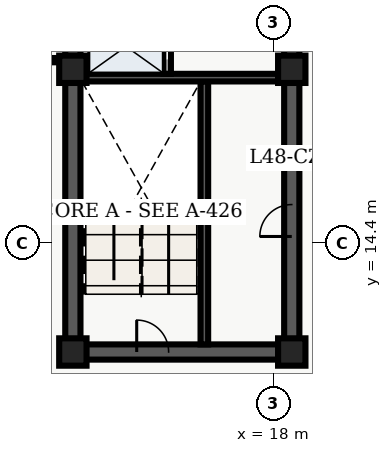
"""IFC4 building model, lengths in metres.
Left out: names, types, materials, properties, quantities, classifications, styles, units other than length and angle.
Written with IfcOpenShell. Run it as: python <this file> out.ifc"""

import sys

from ifc_helpers import new_model, entity, si_unit, converted_unit, direction, frame, origin_with_axes, origin_2d_with_axis, place, context, subcontext, project, spatial, polyline, rectangle, outline, extrude, element, fill, save


model = new_model("IFC4")
c1 = context("Model", 3, precision=1e-05, world=origin_with_axes(), true_north=direction((0.0, 1.0)))
c2 = subcontext(c1, "Body", "Model", "MODEL_VIEW")
j1 = project(units=[si_unit("LENGTHUNIT", "METRE"), converted_unit("PLANEANGLEUNIT", "DEGREE", entity("IfcPlaneAngleMeasure", 0.017), si_unit("PLANEANGLEUNIT", "RADIAN"), dimensions=[0, 0, 0, 0, 0, 0, 0])], contexts=[c1])
p1 = place(None, origin_with_axes())
s1 = spatial("IfcSite", under=j1, at=p1, CompositionType="ELEMENT")
p2 = place(p1, origin_with_axes())
s2 = spatial("IfcBuilding", under=s1, at=p2, CompositionType="ELEMENT")
p3 = place(p2, frame((0.0, 0.0, 196.5), z_axis=(0.0, 0.0, 1.0), x_axis=(1.0, 0.0, 0.0)))
s3 = spatial("IfcBuildingStorey", under=s2, at=p3, CompositionType="ELEMENT", Elevation=196.5)
p4 = place(p3, frame((11.4, 10.8, 0.0), z_axis=(0.0, 0.0, 1.0), x_axis=(0.0, 1.0, 0.0)))
e1 = element("IfcWall", 1, at=p4, inside=s3, PredefinedType="SHEAR", context=c2, shape_type="SweptSolid", body=[
    extrude(outline(polyline([(0.0, -0.25), (27.0, -0.25), (27.0, 0.25), (0.0, 0.25), (0.0, -0.25)])), origin_with_axes(), (0.0, 0.0, 1.0), 3.66),
])
p5 = place(p3, frame((11.4, 10.8, 0.0), z_axis=(0.0, 0.0, 1.0), x_axis=(1.0, 0.0, 0.0)))
e2 = element("IfcWall", 2, at=p5, inside=s3, PredefinedType="SHEAR", context=c2, shape_type="SweptSolid", body=[
    extrude(outline(polyline([(0.0, -0.25), (7.2, -0.25), (7.2, 0.25), (0.0, 0.25), (0.0, -0.25)])), origin_with_axes(), (0.0, 0.0, 1.0), 3.66),
])
p6 = place(p5, frame((2.625, 0.0, 0.0), z_axis=(0.0, 0.0, 1.0), x_axis=(1.0, 0.0, 0.0)))
e3 = element("IfcOpeningElement", 3, at=p6, cuts=e2, PredefinedType="OPENING", context=c2, shape_type="SweptSolid", body=[
    extrude(rectangle(XDim=1.05, YDim=0.52, at=origin_2d_with_axis()), origin_with_axes(), (0.0, 0.0, 1.0), 2.15),
])
p7 = place(p3, frame((18.6, 10.8, 0.0), z_axis=(0.0, 0.0, 1.0), x_axis=(0.0, 1.0, 0.0)))
e4 = element("IfcWall", 4, at=p7, inside=s3, PredefinedType="SHEAR", context=c2, shape_type="SweptSolid", body=[
    extrude(outline(polyline([(0.0, -0.25), (13.5, -0.25), (13.5, 0.25), (0.0, 0.25), (0.0, -0.25)])), origin_with_axes(), (0.0, 0.0, 1.0), 3.66),
])
p8 = place(p7, frame((11.125, 0.0, 0.0), z_axis=(0.0, 0.0, 1.0), x_axis=(1.0, 0.0, 0.0)))
e5 = element("IfcOpeningElement", 5, at=p8, cuts=e4, PredefinedType="OPENING", context=c2, shape_type="SweptSolid", body=[
    extrude(rectangle(XDim=1.05, YDim=0.52, at=origin_2d_with_axis()), origin_with_axes(), (0.0, 0.0, 1.0), 2.15),
])
p9 = place(p7, frame((4.325, 0.0, 0.0), z_axis=(0.0, 0.0, 1.0), x_axis=(1.0, 0.0, 0.0)))
e6 = element("IfcOpeningElement", 6, at=p9, cuts=e4, PredefinedType="OPENING", context=c2, shape_type="SweptSolid", body=[
    extrude(rectangle(XDim=1.05, YDim=0.52, at=origin_2d_with_axis()), origin_with_axes(), (0.0, 0.0, 1.0), 2.15),
])
p10 = place(p3, frame((15.725, 11.05, 0.0), z_axis=(0.0, 0.0, 1.0), x_axis=(0.0, 1.0, 0.0)))
e7 = element("IfcWall", 7, at=p10, inside=s3, PredefinedType="SHEAR", context=c2, shape_type="SweptSolid", body=[
    extrude(outline(polyline([(0.0, -0.125), (8.65, -0.125), (8.65, 0.125), (0.0, 0.125), (0.0, -0.125)])), origin_with_axes(), (0.0, 0.0, 1.0), 3.66),
])
p11 = place(p3, frame((11.65, 19.825, 0.0), z_axis=(0.0, 0.0, 1.0), x_axis=(1.0, 0.0, 0.0)))
e8 = element("IfcWall", 8, at=p11, inside=s3, PredefinedType="SHEAR", context=c2, shape_type="SweptSolid", body=[
    extrude(outline(polyline([(0.0, -0.125), (6.7, -0.125), (6.7, 0.125), (0.0, 0.125), (0.0, -0.125)])), origin_with_axes(), (0.0, 0.0, 1.0), 3.66),
])
p12 = place(p3, frame((14.5, 19.95, 0.0), z_axis=(0.0, 0.0, 1.0), x_axis=(0.0, 1.0, 0.0)))
e9 = element("IfcWall", 9, at=p12, inside=s3, PredefinedType="SOLIDWALL", context=c2, shape_type="SweptSolid", body=[
    extrude(outline(polyline([(0.0, -0.125), (6.25, -0.125), (6.25, 0.125), (0.0, 0.125), (0.0, -0.125)])), origin_with_axes(), (0.0, 0.0, 1.0), 2.7),
])
p13 = place(p12, frame((1.025, 0.0, 0.0), z_axis=(0.0, 0.0, 1.0), x_axis=(1.0, 0.0, 0.0)))
e10 = element("IfcOpeningElement", 10, at=p13, cuts=e9, PredefinedType="OPENING", context=c2, shape_type="SweptSolid", body=[
    extrude(rectangle(XDim=1.1, YDim=0.27, at=origin_2d_with_axis()), origin_with_axes(), (0.0, 0.0, 1.0), 2.15),
])
p14 = place(p12, frame((2.975, 0.0, 0.0), z_axis=(0.0, 0.0, 1.0), x_axis=(1.0, 0.0, 0.0)))
e11 = element("IfcOpeningElement", 11, at=p14, cuts=e9, PredefinedType="OPENING", context=c2, shape_type="SweptSolid", body=[
    extrude(rectangle(XDim=1.1, YDim=0.27, at=origin_2d_with_axis()), origin_with_axes(), (0.0, 0.0, 1.0), 2.15),
])
p15 = place(p12, frame((5.425, 0.0, 0.0), z_axis=(0.0, 0.0, 1.0), x_axis=(1.0, 0.0, 0.0)))
e12 = element("IfcOpeningElement", 12, at=p15, cuts=e9, PredefinedType="OPENING", context=c2, shape_type="SweptSolid", body=[
    extrude(rectangle(XDim=1.2, YDim=0.27, at=origin_2d_with_axis()), origin_with_axes(), (0.0, 0.0, 1.0), 2.15),
])
for number, where, z_axis, x_axis in (
    (13, (11.4, 10.8, 0.0), (0.0, 0.0, 1.0), (1.0, 0.0, 0.0)),
    (14, (11.4, 20.1, 0.0), (0.0, 0.0, 1.0), (1.0, 0.0, 0.0)),
    (15, (18.6, 10.8, 0.0), (0.0, 0.0, 1.0), (1.0, 0.0, 0.0)),
    (16, (18.6, 20.1, 0.0), (0.0, 0.0, 1.0), (1.0, 0.0, 0.0)),
):
    element("IfcColumn", number, at=place(p3, frame(where, z_axis=z_axis, x_axis=x_axis)), inside=s3, PredefinedType="COLUMN", context=c2, shape_type="SweptSolid", body=[
        extrude(rectangle(XDim=0.9, YDim=0.9, at=origin_2d_with_axis()), origin_with_axes(), (0.0, 0.0, 1.0), 3.9),
    ])
p16 = place(p3, frame((9.52, 20.4, 0.0), z_axis=(0.0, 0.0, 1.0), x_axis=(1.0, 0.0, 0.0)))
e17 = element("IfcWall", 17, at=p16, inside=s3, PredefinedType="PARTITIONING", context=c2, shape_type="SweptSolid", body=[
    extrude(outline(polyline([(0.0, -0.07), (1.58, -0.07), (1.58, 0.07), (0.0, 0.07), (0.0, -0.07)])), origin_with_axes(), (0.0, 0.0, 1.0), 2.7),
])
p17 = place(p12, frame((1.025, 0.0, 0.0), z_axis=(0.0, 0.0, 1.0), x_axis=(1.0, 0.0, 0.0)))
e18 = element("IfcDoor", 18, at=p17, inside=s3, OperationType="SLIDING_TO_LEFT", PredefinedType="DOOR", context=c2, shape_type="SweptSolid", body=[
    extrude(rectangle(XDim=1.1, YDim=0.09, at=origin_2d_with_axis()), origin_with_axes(), (0.0, 0.0, 1.0), 2.15),
])
fill(e10, e18)
p18 = place(p5, frame((2.625, 0.0, 0.0), z_axis=(0.0, 0.0, 1.0), x_axis=(1.0, 0.0, 0.0)))
e19 = element("IfcDoor", 19, at=p18, inside=s3, OperationType="SINGLE_SWING_LEFT", PredefinedType="DOOR", context=c2, shape_type="SweptSolid", body=[
    extrude(rectangle(XDim=1.05, YDim=0.09, at=origin_2d_with_axis()), origin_with_axes(), (0.0, 0.0, 1.0), 2.15),
])
fill(e3, e19)
p19 = place(p7, frame((4.325, 0.0, 0.0), z_axis=(0.0, 0.0, 1.0), x_axis=(1.0, 0.0, 0.0)))
e20 = element("IfcDoor", 20, at=p19, inside=s3, OperationType="SINGLE_SWING_LEFT", PredefinedType="DOOR", context=c2, shape_type="SweptSolid", body=[
    extrude(rectangle(XDim=1.05, YDim=0.09, at=origin_2d_with_axis()), origin_with_axes(), (0.0, 0.0, 1.0), 2.15),
])
fill(e6, e20)
save(model, sys.argv[1])
